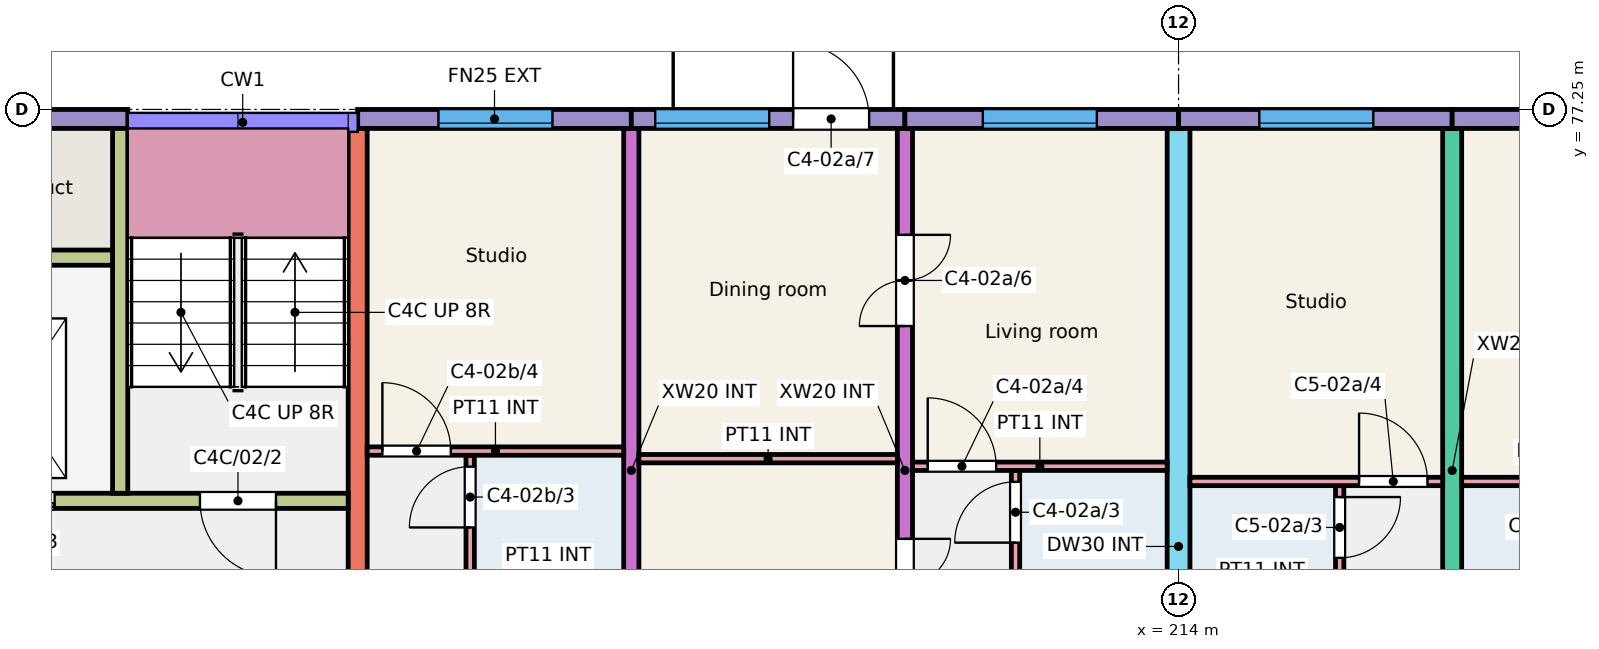
"""IFC4 building model, lengths in metres.
Left out: names, types, materials, properties, quantities, classifications, styles, units other than length and angle.
Written with IfcOpenShell. Run it as: python <this file> out.ifc"""

import sys

from ifc_helpers import new_model, si_unit, direction, frame, frame_2d, origin, place, context, subcontext, project, spatial, rectangle, extrude, element, fill, save


model = new_model("IFC4")
c1 = context("Model", 3, precision=1e-05, world=origin(), true_north=direction((0.0, 1.0)))
c2 = subcontext(c1, "Body", "Model", "MODEL_VIEW")
j1 = project(units=[si_unit("LENGTHUNIT", "METRE"), si_unit("PLANEANGLEUNIT", "RADIAN")], contexts=[c1])
p1 = place(None, origin())
s1 = spatial("IfcSite", under=j1, at=p1, CompositionType="ELEMENT")
p2 = place(p1, origin())
s2 = spatial("IfcBuilding", under=s1, at=p2, CompositionType="ELEMENT")
p3 = place(p2, frame((0.0, 0.0, 6.0)))
s3 = spatial("IfcBuildingStorey", under=s2, at=p3, CompositionType="ELEMENT", Elevation=6.0)
p4 = place(p3, frame((203.2, 68.0, 0.0), z_axis=(0.0, 0.0, 1.0), x_axis=(0.0, 1.0, 0.0)))
e1 = element("IfcWall", 1, at=p4, inside=s3, PredefinedType="SHEAR", context=c2, shape_type="SweptSolid", body=[
    extrude(rectangle(XDim=9.0, YDim=0.25, at=frame_2d((4.5, 0.0))), origin(), (0.0, 0.0, 1.0), 3.0),
])
p5 = place(p3, frame((206.8, 68.0, 0.0), z_axis=(0.0, 0.0, 1.0), x_axis=(0.0, 1.0, 0.0)))
e2 = element("IfcWall", 2, at=p5, inside=s3, PredefinedType="SHEAR", context=c2, shape_type="SweptSolid", body=[
    extrude(rectangle(XDim=9.0, YDim=0.2, at=frame_2d((4.5, 0.0))), origin(), (0.0, 0.0, 1.0), 3.0),
])
p6 = place(p3, frame((210.4, 68.0, 0.0), z_axis=(0.0, 0.0, 1.0), x_axis=(0.0, 1.0, 0.0)))
e3 = element("IfcWall", 3, at=p6, inside=s3, PredefinedType="SHEAR", context=c2, shape_type="SweptSolid", body=[
    extrude(rectangle(XDim=9.0, YDim=0.2, at=frame_2d((4.5, 0.0))), origin(), (0.0, 0.0, 1.0), 3.0),
])
p7 = place(p6, frame((2.4, 0.0, 0.0)))
e4 = element("IfcOpeningElement", 4, at=p7, cuts=e3, PredefinedType="OPENING", context=c2, shape_type="SweptSolid", body=[
    extrude(rectangle(XDim=1.2, YDim=2.1, at=frame_2d((0.6, 1.05))), frame((0.0, 0.11, 0.0), z_axis=(0.0, -1.0, 0.0), x_axis=(1.0, 0.0, 0.0)), (0.0, 0.0, 1.0), 0.22),
])
p8 = place(p6, frame((6.4, 0.0, 0.0)))
e5 = element("IfcOpeningElement", 5, at=p8, cuts=e3, PredefinedType="OPENING", context=c2, shape_type="SweptSolid", body=[
    extrude(rectangle(XDim=1.2, YDim=2.1, at=frame_2d((0.6, 1.05))), frame((0.0, 0.11, 0.0), z_axis=(0.0, -1.0, 0.0), x_axis=(1.0, 0.0, 0.0)), (0.0, 0.0, 1.0), 0.22),
])
p9 = place(p3, frame((214.0, 66.0, 0.0), z_axis=(0.0, 0.0, 1.0), x_axis=(0.0, 1.0, 0.0)))
e6 = element("IfcWall", 6, at=p9, inside=s3, PredefinedType="SHEAR", context=c2, shape_type="SweptSolid", body=[
    extrude(rectangle(XDim=11.0, YDim=0.3, at=frame_2d((5.5, 0.0))), origin(), (0.0, 0.0, 1.0), 3.0),
])
p10 = place(p9, frame((0.3, 0.0, 0.0)))
e7 = element("IfcOpeningElement", 7, at=p10, cuts=e6, PredefinedType="OPENING", context=c2, shape_type="SweptSolid", body=[
    extrude(rectangle(XDim=1.2, YDim=2.1, at=frame_2d((0.6, 1.05))), frame((0.0, 0.16, 0.0), z_axis=(0.0, -1.0, 0.0), x_axis=(1.0, 0.0, 0.0)), (0.0, 0.0, 1.0), 0.32),
])
p11 = place(p3, frame((217.6, 68.0, 0.0), z_axis=(0.0, 0.0, 1.0), x_axis=(0.0, 1.0, 0.0)))
e8 = element("IfcWall", 8, at=p11, inside=s3, PredefinedType="SHEAR", context=c2, shape_type="SweptSolid", body=[
    extrude(rectangle(XDim=9.0, YDim=0.25, at=frame_2d((4.5, 0.0))), origin(), (0.0, 0.0, 1.0), 3.0),
])
p12 = place(p3, frame((197.2, 77.125, 0.0), z_axis=(0.0, 0.0, 1.0), x_axis=(1.0, 0.0, 0.0)))
e9 = element("IfcWall", 9, at=p12, inside=s3, PredefinedType="SOLIDWALL", context=c2, shape_type="SweptSolid", body=[
    extrude(rectangle(XDim=2.975, YDim=0.25, at=frame_2d((1.488, 0.0))), origin(), (0.0, 0.0, 1.0), 3.0),
])
p13 = place(p3, frame((197.35, 72.1, 0.0), z_axis=(0.0, 0.0, 1.0), x_axis=(1.0, 0.0, 0.0)))
e10 = element("IfcWall", 10, at=p13, inside=s3, PredefinedType="SHEAR", context=c2, shape_type="SweptSolid", body=[
    extrude(rectangle(XDim=5.725, YDim=0.2, at=frame_2d((2.862, 0.0))), origin(), (0.0, 0.0, 1.0), 3.0),
])
p14 = place(p13, frame((3.775, 0.0, 0.0)))
e11 = element("IfcOpeningElement", 11, at=p14, cuts=e10, PredefinedType="OPENING", context=c2, shape_type="SweptSolid", body=[
    extrude(rectangle(XDim=1.0, YDim=2.1, at=frame_2d((0.5, 1.05))), frame((0.0, 0.11, 0.0), z_axis=(0.0, -1.0, 0.0), x_axis=(1.0, 0.0, 0.0)), (0.0, 0.0, 1.0), 0.22),
])
p15 = place(p13, frame((0.762, 0.0, 0.0)))
e12 = element("IfcOpeningElement", 12, at=p15, cuts=e10, PredefinedType="OPENING", context=c2, shape_type="SweptSolid", body=[
    extrude(rectangle(XDim=1.1, YDim=2.1, at=frame_2d((0.55, 1.05))), frame((0.0, 0.11, 0.0), z_axis=(0.0, -1.0, 0.0), x_axis=(1.0, 0.0, 0.0)), (0.0, 0.0, 1.0), 0.22),
])
p16 = place(p3, frame((200.075, 72.2, 0.0), z_axis=(0.0, 0.0, 1.0), x_axis=(0.0, 1.0, 0.0)))
e13 = element("IfcWall", 13, at=p16, inside=s3, PredefinedType="SHEAR", context=c2, shape_type="SweptSolid", body=[
    extrude(rectangle(XDim=4.8, YDim=0.2, at=frame_2d((2.4, 0.0))), origin(), (0.0, 0.0, 1.0), 3.0),
])
p17 = place(p3, frame((197.35, 75.3, 0.0), z_axis=(0.0, 0.0, 1.0), x_axis=(1.0, 0.0, 0.0)))
e14 = element("IfcWall", 14, at=p17, inside=s3, PredefinedType="SHEAR", context=c2, shape_type="SweptSolid", body=[
    extrude(rectangle(XDim=2.625, YDim=0.2, at=frame_2d((1.312, 0.0))), origin(), (0.0, 0.0, 1.0), 3.0),
])
p18 = place(p3, frame((203.2, 77.125, 0.0), z_axis=(0.0, 0.0, 1.0), x_axis=(1.0, 0.0, 0.0)))
e15 = element("IfcWall", 15, at=p18, inside=s3, PredefinedType="SOLIDWALL", context=c2, shape_type="SweptSolid", body=[
    extrude(rectangle(XDim=3.6, YDim=0.25, at=frame_2d((1.8, 0.0))), origin(), (0.0, 0.0, 1.0), 3.0),
])
p19 = place(p18, frame((1.062, 0.0, 0.9)))
e16 = element("IfcOpeningElement", 16, at=p19, cuts=e15, PredefinedType="OPENING", context=c2, shape_type="SweptSolid", body=[
    extrude(rectangle(XDim=1.5, YDim=1.5, at=frame_2d((0.75, 0.75))), frame((0.0, 0.135, 0.0), z_axis=(0.0, -1.0, 0.0), x_axis=(1.0, 0.0, 0.0)), (0.0, 0.0, 1.0), 0.27),
])
p20 = place(p3, frame((206.8, 77.125, 0.0), z_axis=(0.0, 0.0, 1.0), x_axis=(1.0, 0.0, 0.0)))
e17 = element("IfcWall", 17, at=p20, inside=s3, PredefinedType="SOLIDWALL", context=c2, shape_type="SweptSolid", body=[
    extrude(rectangle(XDim=3.6, YDim=0.25, at=frame_2d((1.8, 0.0))), origin(), (0.0, 0.0, 1.0), 3.0),
])
p21 = place(p20, frame((0.314, 0.0, 0.9)))
e18 = element("IfcOpeningElement", 18, at=p21, cuts=e17, PredefinedType="OPENING", context=c2, shape_type="SweptSolid", body=[
    extrude(rectangle(XDim=1.5, YDim=1.5, at=frame_2d((0.75, 0.75))), frame((0.0, 0.135, 0.0), z_axis=(0.0, -1.0, 0.0), x_axis=(1.0, 0.0, 0.0)), (0.0, 0.0, 1.0), 0.27),
])
p22 = place(p20, frame((2.129, 0.0, 0.0)))
e19 = element("IfcOpeningElement", 19, at=p22, cuts=e17, PredefinedType="OPENING", context=c2, shape_type="SweptSolid", body=[
    extrude(rectangle(XDim=1.0, YDim=2.1, at=frame_2d((0.5, 1.05))), frame((0.0, 0.135, 0.0), z_axis=(0.0, -1.0, 0.0), x_axis=(1.0, 0.0, 0.0)), (0.0, 0.0, 1.0), 0.27),
])
p23 = place(p3, frame((210.4, 77.125, 0.0), z_axis=(0.0, 0.0, 1.0), x_axis=(1.0, 0.0, 0.0)))
e20 = element("IfcWall", 20, at=p23, inside=s3, PredefinedType="SOLIDWALL", context=c2, shape_type="SweptSolid", body=[
    extrude(rectangle(XDim=3.6, YDim=0.25, at=frame_2d((1.8, 0.0))), origin(), (0.0, 0.0, 1.0), 3.0),
])
p24 = place(p23, frame((1.025, 0.0, 0.9)))
e21 = element("IfcOpeningElement", 21, at=p24, cuts=e20, PredefinedType="OPENING", context=c2, shape_type="SweptSolid", body=[
    extrude(rectangle(XDim=1.5, YDim=1.5, at=frame_2d((0.75, 0.75))), frame((0.0, 0.135, 0.0), z_axis=(0.0, -1.0, 0.0), x_axis=(1.0, 0.0, 0.0)), (0.0, 0.0, 1.0), 0.27),
])
p25 = place(p3, frame((214.0, 77.125, 0.0), z_axis=(0.0, 0.0, 1.0), x_axis=(1.0, 0.0, 0.0)))
e22 = element("IfcWall", 22, at=p25, inside=s3, PredefinedType="SOLIDWALL", context=c2, shape_type="SweptSolid", body=[
    extrude(rectangle(XDim=3.6, YDim=0.25, at=frame_2d((1.8, 0.0))), origin(), (0.0, 0.0, 1.0), 3.0),
])
p26 = place(p25, frame((1.062, 0.0, 0.9)))
e23 = element("IfcOpeningElement", 23, at=p26, cuts=e22, PredefinedType="OPENING", context=c2, shape_type="SweptSolid", body=[
    extrude(rectangle(XDim=1.5, YDim=1.5, at=frame_2d((0.75, 0.75))), frame((0.0, 0.135, 0.0), z_axis=(0.0, -1.0, 0.0), x_axis=(1.0, 0.0, 0.0)), (0.0, 0.0, 1.0), 0.27),
])
p27 = place(p3, frame((217.6, 77.125, 0.0), z_axis=(0.0, 0.0, 1.0), x_axis=(1.0, 0.0, 0.0)))
e24 = element("IfcWall", 24, at=p27, inside=s3, PredefinedType="SOLIDWALL", context=c2, shape_type="SweptSolid", body=[
    extrude(rectangle(XDim=3.6, YDim=0.25, at=frame_2d((1.8, 0.0))), origin(), (0.0, 0.0, 1.0), 3.0),
])
p28 = place(p27, frame((1.05, 0.0, 0.9)))
e25 = element("IfcOpeningElement", 25, at=p28, cuts=e24, PredefinedType="OPENING", context=c2, shape_type="SweptSolid", body=[
    extrude(rectangle(XDim=1.5, YDim=1.5, at=frame_2d((0.75, 0.75))), frame((0.0, 0.135, 0.0), z_axis=(0.0, -1.0, 0.0), x_axis=(1.0, 0.0, 0.0)), (0.0, 0.0, 1.0), 0.27),
])
p29 = place(p3, frame((211.855, 68.0, 0.0), z_axis=(0.0, 0.0, 1.0), x_axis=(0.0, 1.0, 0.0)))
e26 = element("IfcWall", 26, at=p29, inside=s3, PredefinedType="PARTITIONING", context=c2, shape_type="SweptSolid", body=[
    extrude(rectangle(XDim=4.5, YDim=0.11, at=frame_2d((2.25, 0.0))), origin(), (0.0, 0.0, 1.0), 2.8),
])
p30 = place(p29, frame((0.2, 0.0, 0.0)))
e27 = element("IfcOpeningElement", 27, at=p30, cuts=e26, PredefinedType="OPENING", context=c2, shape_type="SweptSolid", body=[
    extrude(rectangle(XDim=0.8, YDim=2.1, at=frame_2d((0.4, 1.05))), frame((0.0, 0.065, 0.0), z_axis=(0.0, -1.0, 0.0), x_axis=(1.0, 0.0, 0.0)), (0.0, 0.0, 1.0), 0.13),
])
p31 = place(p29, frame((3.55, 0.0, 0.0)))
e28 = element("IfcOpeningElement", 28, at=p31, cuts=e26, PredefinedType="OPENING", context=c2, shape_type="SweptSolid", body=[
    extrude(rectangle(XDim=0.8, YDim=2.1, at=frame_2d((0.4, 1.05))), frame((0.0, 0.065, 0.0), z_axis=(0.0, -1.0, 0.0), x_axis=(1.0, 0.0, 0.0)), (0.0, 0.0, 1.0), 0.13),
])
p32 = place(p3, frame((210.5, 72.555, 0.0), z_axis=(0.0, 0.0, 1.0), x_axis=(1.0, 0.0, 0.0)))
e29 = element("IfcWall", 29, at=p32, inside=s3, PredefinedType="PARTITIONING", context=c2, shape_type="SweptSolid", body=[
    extrude(rectangle(XDim=3.35, YDim=0.11, at=frame_2d((1.675, 0.0))), origin(), (0.0, 0.0, 1.0), 2.8),
])
p33 = place(p32, frame((0.2, 0.0, 0.0)))
e30 = element("IfcOpeningElement", 30, at=p33, cuts=e29, PredefinedType="OPENING", context=c2, shape_type="SweptSolid", body=[
    extrude(rectangle(XDim=0.9, YDim=2.1, at=frame_2d((0.45, 1.05))), frame((0.0, 0.065, 0.0), z_axis=(0.0, -1.0, 0.0), x_axis=(1.0, 0.0, 0.0)), (0.0, 0.0, 1.0), 0.13),
])
p34 = place(p3, frame((206.9, 72.655, 0.0), z_axis=(0.0, 0.0, 1.0), x_axis=(1.0, 0.0, 0.0)))
e31 = element("IfcWall", 31, at=p34, inside=s3, PredefinedType="PARTITIONING", context=c2, shape_type="SweptSolid", body=[
    extrude(rectangle(XDim=3.4, YDim=0.11, at=frame_2d((1.7, 0.0))), origin(), (0.0, 0.0, 1.0), 2.8),
])
p35 = place(p3, frame((204.68, 68.0, 0.0), z_axis=(0.0, 0.0, 1.0), x_axis=(0.0, 1.0, 0.0)))
e32 = element("IfcWall", 32, at=p35, inside=s3, PredefinedType="PARTITIONING", context=c2, shape_type="SweptSolid", body=[
    extrude(rectangle(XDim=4.7, YDim=0.11, at=frame_2d((2.35, 0.0))), origin(), (0.0, 0.0, 1.0), 2.8),
])
p36 = place(p35, frame((0.2, 0.0, 0.0)))
e33 = element("IfcOpeningElement", 33, at=p36, cuts=e32, PredefinedType="OPENING", context=c2, shape_type="SweptSolid", body=[
    extrude(rectangle(XDim=0.8, YDim=2.1, at=frame_2d((0.4, 1.05))), frame((0.0, 0.065, 0.0), z_axis=(0.0, -1.0, 0.0), x_axis=(1.0, 0.0, 0.0)), (0.0, 0.0, 1.0), 0.13),
])
p37 = place(p35, frame((3.75, 0.0, 0.0)))
e34 = element("IfcOpeningElement", 34, at=p37, cuts=e32, PredefinedType="OPENING", context=c2, shape_type="SweptSolid", body=[
    extrude(rectangle(XDim=0.8, YDim=2.1, at=frame_2d((0.4, 1.05))), frame((0.0, 0.065, 0.0), z_axis=(0.0, -1.0, 0.0), x_axis=(1.0, 0.0, 0.0)), (0.0, 0.0, 1.0), 0.13),
])
p38 = place(p3, frame((203.325, 72.755, 0.0), z_axis=(0.0, 0.0, 1.0), x_axis=(1.0, 0.0, 0.0)))
e35 = element("IfcWall", 35, at=p38, inside=s3, PredefinedType="PARTITIONING", context=c2, shape_type="SweptSolid", body=[
    extrude(rectangle(XDim=3.375, YDim=0.11, at=frame_2d((1.688, 0.0))), origin(), (0.0, 0.0, 1.0), 2.8),
])
p39 = place(p38, frame((0.2, 0.0, 0.0)))
e36 = element("IfcOpeningElement", 36, at=p39, cuts=e35, PredefinedType="OPENING", context=c2, shape_type="SweptSolid", body=[
    extrude(rectangle(XDim=0.9, YDim=2.1, at=frame_2d((0.45, 1.05))), frame((0.0, 0.065, 0.0), z_axis=(0.0, -1.0, 0.0), x_axis=(1.0, 0.0, 0.0)), (0.0, 0.0, 1.0), 0.13),
])
p40 = place(p3, frame((216.12, 68.0, 0.0), z_axis=(0.0, 0.0, 1.0), x_axis=(0.0, 1.0, 0.0)))
e37 = element("IfcWall", 37, at=p40, inside=s3, PredefinedType="PARTITIONING", context=c2, shape_type="SweptSolid", body=[
    extrude(rectangle(XDim=4.3, YDim=0.11, at=frame_2d((2.15, 0.0))), origin(), (0.0, 0.0, 1.0), 2.8),
])
p41 = place(p40, frame((0.2, 0.0, 0.0)))
e38 = element("IfcOpeningElement", 38, at=p41, cuts=e37, PredefinedType="OPENING", context=c2, shape_type="SweptSolid", body=[
    extrude(rectangle(XDim=0.8, YDim=2.1, at=frame_2d((0.4, 1.05))), frame((0.0, 0.065, 0.0), z_axis=(0.0, -1.0, 0.0), x_axis=(1.0, 0.0, 0.0)), (0.0, 0.0, 1.0), 0.13),
])
p42 = place(p40, frame((3.35, 0.0, 0.0)))
e39 = element("IfcOpeningElement", 39, at=p42, cuts=e37, PredefinedType="OPENING", context=c2, shape_type="SweptSolid", body=[
    extrude(rectangle(XDim=0.8, YDim=2.1, at=frame_2d((0.4, 1.05))), frame((0.0, 0.065, 0.0), z_axis=(0.0, -1.0, 0.0), x_axis=(1.0, 0.0, 0.0)), (0.0, 0.0, 1.0), 0.13),
])
p43 = place(p3, frame((214.15, 72.355, 0.0), z_axis=(0.0, 0.0, 1.0), x_axis=(1.0, 0.0, 0.0)))
e40 = element("IfcWall", 40, at=p43, inside=s3, PredefinedType="PARTITIONING", context=c2, shape_type="SweptSolid", body=[
    extrude(rectangle(XDim=3.325, YDim=0.11, at=frame_2d((1.663, 0.0))), origin(), (0.0, 0.0, 1.0), 2.8),
])
p44 = place(p43, frame((2.225, 0.0, 0.0)))
e41 = element("IfcOpeningElement", 41, at=p44, cuts=e40, PredefinedType="OPENING", context=c2, shape_type="SweptSolid", body=[
    extrude(rectangle(XDim=0.9, YDim=2.1, at=frame_2d((0.45, 1.05))), frame((0.0, 0.065, 0.0), z_axis=(0.0, -1.0, 0.0), x_axis=(1.0, 0.0, 0.0)), (0.0, 0.0, 1.0), 0.13),
])
p45 = place(p3, frame((217.725, 72.355, 0.0), z_axis=(0.0, 0.0, 1.0), x_axis=(1.0, 0.0, 0.0)))
e42 = element("IfcWall", 42, at=p45, inside=s3, PredefinedType="PARTITIONING", context=c2, shape_type="SweptSolid", body=[
    extrude(rectangle(XDim=3.35, YDim=0.11, at=frame_2d((1.675, 0.0))), origin(), (0.0, 0.0, 1.0), 2.8),
])
p46 = place(p45, frame((2.25, 0.0, 0.0)))
e43 = element("IfcOpeningElement", 43, at=p46, cuts=e42, PredefinedType="OPENING", context=c2, shape_type="SweptSolid", body=[
    extrude(rectangle(XDim=0.9, YDim=2.1, at=frame_2d((0.45, 1.05))), frame((0.0, 0.065, 0.0), z_axis=(0.0, -1.0, 0.0), x_axis=(1.0, 0.0, 0.0)), (0.0, 0.0, 1.0), 0.13),
])
p47 = place(p21, origin())
e44 = element("IfcWindow", 44, at=p47, inside=s3, PartitioningType="SINGLE_PANEL", PredefinedType="WINDOW", context=c2, shape_type="SweptSolid", body=[
    extrude(rectangle(XDim=1.5, YDim=1.5, at=frame_2d((0.75, 0.75))), frame((0.0, -0.025, 0.0), z_axis=(0.0, -1.0, 0.0), x_axis=(1.0, 0.0, 0.0)), (0.0, 0.0, 1.0), 0.06),
])
fill(e18, e44)
p48 = place(p24, origin())
e45 = element("IfcWindow", 45, at=p48, inside=s3, PartitioningType="SINGLE_PANEL", PredefinedType="WINDOW", context=c2, shape_type="SweptSolid", body=[
    extrude(rectangle(XDim=1.5, YDim=1.5, at=frame_2d((0.75, 0.75))), frame((0.0, -0.025, 0.0), z_axis=(0.0, -1.0, 0.0), x_axis=(1.0, 0.0, 0.0)), (0.0, 0.0, 1.0), 0.06),
])
fill(e21, e45)
p49 = place(p19, origin())
e46 = element("IfcWindow", 46, at=p49, inside=s3, PartitioningType="SINGLE_PANEL", PredefinedType="WINDOW", context=c2, shape_type="SweptSolid", body=[
    extrude(rectangle(XDim=1.5, YDim=1.5, at=frame_2d((0.75, 0.75))), frame((0.0, -0.025, 0.0), z_axis=(0.0, -1.0, 0.0), x_axis=(1.0, 0.0, 0.0)), (0.0, 0.0, 1.0), 0.06),
])
fill(e16, e46)
p50 = place(p26, origin())
e47 = element("IfcWindow", 47, at=p50, inside=s3, PartitioningType="SINGLE_PANEL", PredefinedType="WINDOW", context=c2, shape_type="SweptSolid", body=[
    extrude(rectangle(XDim=1.5, YDim=1.5, at=frame_2d((0.75, 0.75))), frame((0.0, -0.025, 0.0), z_axis=(0.0, -1.0, 0.0), x_axis=(1.0, 0.0, 0.0)), (0.0, 0.0, 1.0), 0.06),
])
fill(e23, e47)
p51 = place(p31, origin())
e48 = element("IfcDoor", 48, at=p51, inside=s3, OperationType="SINGLE_SWING_LEFT", PredefinedType="DOOR", context=c2, shape_type="SweptSolid", body=[
    extrude(rectangle(XDim=0.8, YDim=2.1, at=frame_2d((0.4, 1.05))), frame((0.0, 0.025, 0.0), z_axis=(0.0, -1.0, 0.0), x_axis=(1.0, 0.0, 0.0)), (0.0, 0.0, 1.0), 0.05),
])
fill(e28, e48)
p52 = place(p33, origin())
e49 = element("IfcDoor", 49, at=p52, inside=s3, OperationType="SINGLE_SWING_LEFT", PredefinedType="DOOR", context=c2, shape_type="SweptSolid", body=[
    extrude(rectangle(XDim=0.9, YDim=2.1, at=frame_2d((0.45, 1.05))), frame((0.0, 0.025, 0.0), z_axis=(0.0, -1.0, 0.0), x_axis=(1.0, 0.0, 0.0)), (0.0, 0.0, 1.0), 0.05),
])
fill(e30, e49)
p53 = place(p7, origin())
e50 = element("IfcDoor", 50, at=p53, inside=s3, OperationType="DOUBLE_DOOR_SINGLE_SWING", PredefinedType="DOOR", context=c2, shape_type="SweptSolid", body=[
    extrude(rectangle(XDim=1.2, YDim=2.1, at=frame_2d((0.6, 1.05))), frame((0.0, 0.025, 0.0), z_axis=(0.0, -1.0, 0.0), x_axis=(1.0, 0.0, 0.0)), (0.0, 0.0, 1.0), 0.05),
])
fill(e4, e50)
p54 = place(p8, origin())
e51 = element("IfcDoor", 51, at=p54, inside=s3, OperationType="DOUBLE_DOOR_SINGLE_SWING", PredefinedType="DOOR", context=c2, shape_type="SweptSolid", body=[
    extrude(rectangle(XDim=1.2, YDim=2.1, at=frame_2d((0.6, 1.05))), frame((0.0, 0.025, 0.0), z_axis=(0.0, -1.0, 0.0), x_axis=(1.0, 0.0, 0.0)), (0.0, 0.0, 1.0), 0.05),
])
fill(e5, e51)
p55 = place(p22, origin())
e52 = element("IfcDoor", 52, at=p55, inside=s3, OperationType="SINGLE_SWING_LEFT", PredefinedType="DOOR", context=c2, shape_type="SweptSolid", body=[
    extrude(rectangle(XDim=1.0, YDim=2.1, at=frame_2d((0.5, 1.05))), frame((0.0, 0.025, 0.0), z_axis=(0.0, -1.0, 0.0), x_axis=(1.0, 0.0, 0.0)), (0.0, 0.0, 1.0), 0.05),
])
fill(e19, e52)
p56 = place(p37, origin())
e53 = element("IfcDoor", 53, at=p56, inside=s3, OperationType="SINGLE_SWING_LEFT", PredefinedType="DOOR", context=c2, shape_type="SweptSolid", body=[
    extrude(rectangle(XDim=0.8, YDim=2.1, at=frame_2d((0.4, 1.05))), frame((0.0, 0.025, 0.0), z_axis=(0.0, -1.0, 0.0), x_axis=(1.0, 0.0, 0.0)), (0.0, 0.0, 1.0), 0.05),
])
fill(e34, e53)
p57 = place(p39, origin())
e54 = element("IfcDoor", 54, at=p57, inside=s3, OperationType="SINGLE_SWING_LEFT", PredefinedType="DOOR", context=c2, shape_type="SweptSolid", body=[
    extrude(rectangle(XDim=0.9, YDim=2.1, at=frame_2d((0.45, 1.05))), frame((0.0, 0.025, 0.0), z_axis=(0.0, -1.0, 0.0), x_axis=(1.0, 0.0, 0.0)), (0.0, 0.0, 1.0), 0.05),
])
fill(e36, e54)
p58 = place(p42, origin())
e55 = element("IfcDoor", 55, at=p58, inside=s3, OperationType="SINGLE_SWING_RIGHT", PredefinedType="DOOR", context=c2, shape_type="SweptSolid", body=[
    extrude(rectangle(XDim=0.8, YDim=2.1, at=frame_2d((0.4, 1.05))), frame((0.0, 0.025, 0.0), z_axis=(0.0, -1.0, 0.0), x_axis=(1.0, 0.0, 0.0)), (0.0, 0.0, 1.0), 0.05),
])
fill(e39, e55)
p59 = place(p44, origin())
e56 = element("IfcDoor", 56, at=p59, inside=s3, OperationType="SINGLE_SWING_LEFT", PredefinedType="DOOR", context=c2, shape_type="SweptSolid", body=[
    extrude(rectangle(XDim=0.9, YDim=2.1, at=frame_2d((0.45, 1.05))), frame((0.0, 0.025, 0.0), z_axis=(0.0, -1.0, 0.0), x_axis=(1.0, 0.0, 0.0)), (0.0, 0.0, 1.0), 0.05),
])
fill(e41, e56)
p60 = place(p14, origin())
e57 = element("IfcDoor", 57, at=p60, inside=s3, OperationType="SINGLE_SWING_RIGHT", PredefinedType="DOOR", context=c2, shape_type="SweptSolid", body=[
    extrude(rectangle(XDim=1.0, YDim=2.1, at=frame_2d((0.5, 1.05))), frame((0.0, 0.025, 0.0), z_axis=(0.0, -1.0, 0.0), x_axis=(1.0, 0.0, 0.0)), (0.0, 0.0, 1.0), 0.05),
])
fill(e11, e57)
p61 = place(p15, origin())
e58 = element("IfcDoor", 58, at=p61, inside=s3, OperationType="DOUBLE_DOOR_SLIDING", PredefinedType="DOOR", context=c2, shape_type="SweptSolid", body=[
    extrude(rectangle(XDim=1.1, YDim=2.1, at=frame_2d((0.55, 1.05))), frame((0.0, 0.025, 0.0), z_axis=(0.0, -1.0, 0.0), x_axis=(1.0, 0.0, 0.0)), (0.0, 0.0, 1.0), 0.05),
])
fill(e12, e58)
save(model, sys.argv[1])
